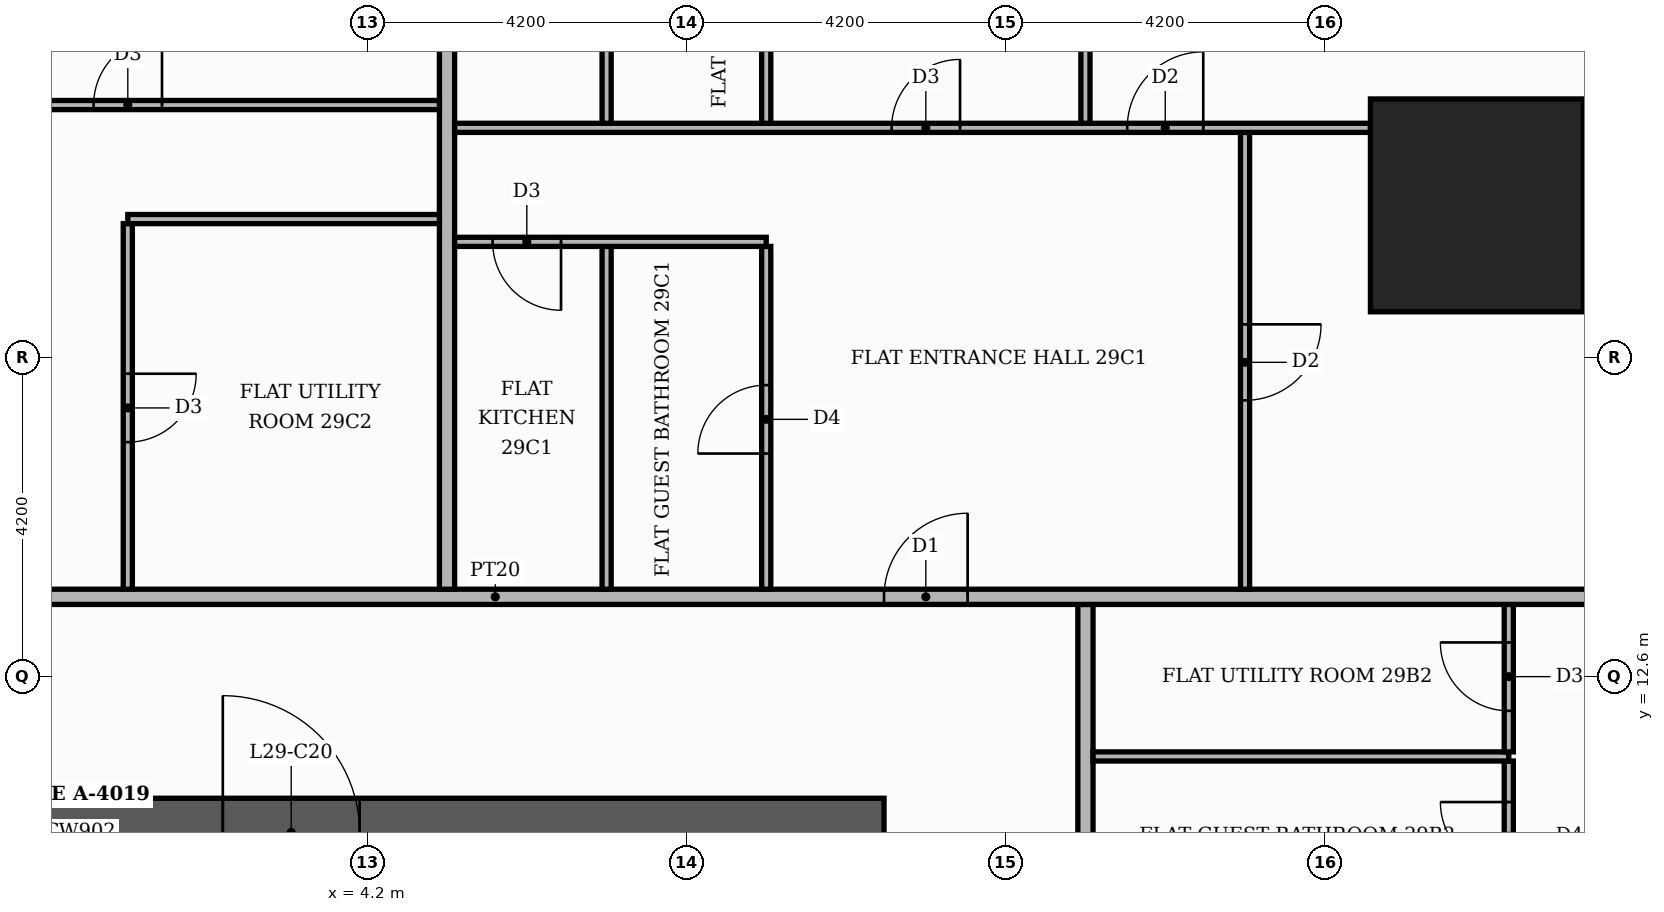
"""IFC4 building model, lengths in metres.
Left out: names, types, materials, properties, quantities, classifications, styles, units other than length and angle.
Written with IfcOpenShell. Run it as: python <this file> out.ifc"""

import sys

from ifc_helpers import new_model, si_unit, direction, frame, frame_2d, origin, origin_2d, place, context, subcontext, project, spatial, rectangle, extrude, element, fill, save


model = new_model("IFC4")
c1 = context("Model", 3, precision=1e-05, world=origin(), true_north=direction((0.0, 1.0)))
c2 = subcontext(c1, "Body", "Model", "MODEL_VIEW")
j1 = project(units=[si_unit("LENGTHUNIT", "METRE"), si_unit("PLANEANGLEUNIT", "RADIAN")], contexts=[c1])
p1 = place(None, origin())
s1 = spatial("IfcSite", under=j1, at=p1, CompositionType="ELEMENT")
p2 = place(p1, origin())
s2 = spatial("IfcBuilding", under=s1, at=p2, CompositionType="ELEMENT")
p3 = place(p2, frame((0.0, 0.0, 122.1)))
s3 = spatial("IfcBuildingStorey", under=s2, at=p3, CompositionType="ELEMENT", Elevation=122.1)
p4 = place(p3, frame((-11.0, 10.55, 0.0), z_axis=(0.0, 0.0, 1.0), x_axis=(1.0, 0.0, 0.0)))
e1 = element("IfcWall", 1, at=p4, inside=s3, PredefinedType="SHEAR", context=c2, shape_type="SweptSolid", body=[
    extrude(rectangle(XDim=22.0, YDim=0.9, at=frame_2d((11.0, 0.0))), origin(), (0.0, 0.0, 1.0), 3.4),
])
p5 = place(p4, frame((13.3, 0.0, 0.0)))
e2 = element("IfcOpeningElement", 2, at=p5, cuts=e1, PredefinedType="OPENING", context=c2, shape_type="SweptSolid", body=[
    extrude(rectangle(XDim=1.8, YDim=2.2, at=frame_2d((0.9, 1.1))), frame((0.0, 0.46, 0.0), z_axis=(0.0, -1.0, 0.0), x_axis=(1.0, 0.0, 0.0)), (0.0, 0.0, 1.0), 0.92),
])
p6 = place(p3, frame((18.8, 18.8, 0.0), z_axis=(0.0, 0.0, 1.0), x_axis=(1.0, 0.0, 0.0)))
e3 = element("IfcColumn", 3, at=p6, inside=s3, PredefinedType="COLUMN", context=c2, shape_type="SweptSolid", body=[
    extrude(rectangle(XDim=2.8, YDim=2.8, at=origin_2d()), origin(), (0.0, 0.0, 1.0), 3.9),
])
p7 = place(p3, frame((13.65, -5.15, 0.0), z_axis=(0.0, 0.0, 1.0), x_axis=(0.0, 1.0, 0.0)))
e4 = element("IfcWall", 4, at=p7, inside=s3, PredefinedType="PARTITIONING", context=c2, shape_type="SweptSolid", body=[
    extrude(rectangle(XDim=18.7, YDim=0.2, at=frame_2d((9.35, 0.0))), origin(), (0.0, 0.0, 1.0), 3.4),
])
p8 = place(p7, frame((5.65, 0.0, 0.0)))
e5 = element("IfcOpeningElement", 5, at=p8, cuts=e4, PredefinedType="OPENING", context=c2, shape_type="SweptSolid", body=[
    extrude(rectangle(XDim=1.1, YDim=2.4, at=frame_2d((0.55, 1.2))), frame((0.0, 0.11, 0.0), z_axis=(0.0, -1.0, 0.0), x_axis=(1.0, 0.0, 0.0)), (0.0, 0.0, 1.0), 0.22),
])
p9 = place(p3, frame((19.22, 9.51, 0.0), z_axis=(0.0, 0.0, 1.0), x_axis=(0.0, 1.0, 0.0)))
e6 = element("IfcWall", 6, at=p9, inside=s3, PredefinedType="PARTITIONING", context=c2, shape_type="SweptSolid", body=[
    extrude(rectangle(XDim=1.98, YDim=0.12, at=frame_2d((0.99, 0.0))), origin(), (0.0, 0.0, 1.0), 3.4),
])
p10 = place(p9, frame((0.54, 0.0, 0.0)))
e7 = element("IfcOpeningElement", 7, at=p10, cuts=e6, PredefinedType="OPENING", context=c2, shape_type="SweptSolid", body=[
    extrude(rectangle(XDim=0.9, YDim=2.1, at=frame_2d((0.45, 1.05))), frame((0.0, 0.07, 0.0), z_axis=(0.0, -1.0, 0.0), x_axis=(1.0, 0.0, 0.0)), (0.0, 0.0, 1.0), 0.14),
])
p11 = place(p3, frame((13.75, 11.55, 0.0), z_axis=(0.0, 0.0, 1.0), x_axis=(1.0, 0.0, 0.0)))
e8 = element("IfcWall", 8, at=p11, inside=s3, PredefinedType="PARTITIONING", context=c2, shape_type="SweptSolid", body=[
    extrude(rectangle(XDim=5.47, YDim=0.12, at=frame_2d((2.735, 0.0))), origin(), (0.0, 0.0, 1.0), 3.4),
])
p12 = place(p3, frame((19.22, 11.61, 0.0), z_axis=(0.0, 0.0, 1.0), x_axis=(0.0, 1.0, 0.0)))
e9 = element("IfcWall", 9, at=p12, inside=s3, PredefinedType="PARTITIONING", context=c2, shape_type="SweptSolid", body=[
    extrude(rectangle(XDim=1.94, YDim=0.12, at=frame_2d((0.97, 0.0))), origin(), (0.0, 0.0, 1.0), 3.4),
])
p13 = place(p12, frame((0.54, 0.0, 0.0)))
e10 = element("IfcOpeningElement", 10, at=p13, cuts=e9, PredefinedType="OPENING", context=c2, shape_type="SweptSolid", body=[
    extrude(rectangle(XDim=0.9, YDim=2.1, at=frame_2d((0.45, 1.05))), frame((0.0, 0.07, 0.0), z_axis=(0.0, -1.0, 0.0), x_axis=(1.0, 0.0, 0.0)), (0.0, 0.0, 1.0), 0.14),
])
p14 = place(p3, frame((-13.65, 13.65, 0.0), z_axis=(0.0, 0.0, 1.0), x_axis=(1.0, 0.0, 0.0)))
e11 = element("IfcWall", 11, at=p14, inside=s3, PredefinedType="PARTITIONING", context=c2, shape_type="SweptSolid", body=[
    extrude(rectangle(XDim=39.07, YDim=0.2, at=frame_2d((19.535, 0.0))), origin(), (0.0, 0.0, 1.0), 3.4),
])
p15 = place(p14, frame((24.65, 0.0, 0.0)))
e12 = element("IfcOpeningElement", 12, at=p15, cuts=e11, PredefinedType="OPENING", context=c2, shape_type="SweptSolid", body=[
    extrude(rectangle(XDim=1.1, YDim=2.4, at=frame_2d((0.55, 1.2))), frame((0.0, 0.11, 0.0), z_axis=(0.0, -1.0, 0.0), x_axis=(1.0, 0.0, 0.0)), (0.0, 0.0, 1.0), 0.22),
])
p16 = place(p14, frame((12.05, 0.0, 0.0)))
e13 = element("IfcOpeningElement", 13, at=p16, cuts=e11, PredefinedType="OPENING", context=c2, shape_type="SweptSolid", body=[
    extrude(rectangle(XDim=1.1, YDim=2.4, at=frame_2d((0.55, 1.2))), frame((0.0, 0.11, 0.0), z_axis=(0.0, -1.0, 0.0), x_axis=(1.0, 0.0, 0.0)), (0.0, 0.0, 1.0), 0.22),
])
p17 = place(p3, frame((1.05, 13.75, 0.0), z_axis=(0.0, 0.0, 1.0), x_axis=(0.0, 1.0, 0.0)))
e14 = element("IfcWall", 14, at=p17, inside=s3, PredefinedType="PARTITIONING", context=c2, shape_type="SweptSolid", body=[
    extrude(rectangle(XDim=4.81, YDim=0.12, at=frame_2d((2.405, 0.0))), origin(), (0.0, 0.0, 1.0), 3.4),
])
p18 = place(p17, frame((1.935, 0.0, 0.0)))
e15 = element("IfcOpeningElement", 15, at=p18, cuts=e14, PredefinedType="OPENING", context=c2, shape_type="SweptSolid", body=[
    extrude(rectangle(XDim=0.9, YDim=2.1, at=frame_2d((0.45, 1.05))), frame((0.0, 0.07, 0.0), z_axis=(0.0, -1.0, 0.0), x_axis=(1.0, 0.0, 0.0)), (0.0, 0.0, 1.0), 0.14),
])
p19 = place(p3, frame((5.25, 13.75, 0.0), z_axis=(0.0, 0.0, 1.0), x_axis=(0.0, 1.0, 0.0)))
e16 = element("IfcWall", 16, at=p19, inside=s3, PredefinedType="PARTITIONING", context=c2, shape_type="SweptSolid", body=[
    extrude(rectangle(XDim=11.67, YDim=0.2, at=frame_2d((5.835, 0.0))), origin(), (0.0, 0.0, 1.0), 3.4),
])
p20 = place(p3, frame((7.35, 13.75, 0.0), z_axis=(0.0, 0.0, 1.0), x_axis=(0.0, 1.0, 0.0)))
e17 = element("IfcWall", 17, at=p20, inside=s3, PredefinedType="PARTITIONING", context=c2, shape_type="SweptSolid", body=[
    extrude(rectangle(XDim=4.51, YDim=0.12, at=frame_2d((2.255, 0.0))), origin(), (0.0, 0.0, 1.0), 3.4),
])
p21 = place(p3, frame((9.45, 13.75, 0.0), z_axis=(0.0, 0.0, 1.0), x_axis=(0.0, 1.0, 0.0)))
e18 = element("IfcWall", 18, at=p21, inside=s3, PredefinedType="PARTITIONING", context=c2, shape_type="SweptSolid", body=[
    extrude(rectangle(XDim=4.51, YDim=0.12, at=frame_2d((2.255, 0.0))), origin(), (0.0, 0.0, 1.0), 3.4),
])
p22 = place(p21, frame((1.785, 0.0, 0.0)))
e19 = element("IfcOpeningElement", 19, at=p22, cuts=e18, PredefinedType="OPENING", context=c2, shape_type="SweptSolid", body=[
    extrude(rectangle(XDim=0.9, YDim=2.1, at=frame_2d((0.45, 1.05))), frame((0.0, 0.07, 0.0), z_axis=(0.0, -1.0, 0.0), x_axis=(1.0, 0.0, 0.0)), (0.0, 0.0, 1.0), 0.14),
])
p23 = place(p3, frame((15.75, 13.75, 0.0), z_axis=(0.0, 0.0, 1.0), x_axis=(0.0, 1.0, 0.0)))
e20 = element("IfcWall", 20, at=p23, inside=s3, PredefinedType="PARTITIONING", context=c2, shape_type="SweptSolid", body=[
    extrude(rectangle(XDim=6.01, YDim=0.12, at=frame_2d((3.005, 0.0))), origin(), (0.0, 0.0, 1.0), 3.4),
])
p24 = place(p23, frame((2.485, 0.0, 0.0)))
e21 = element("IfcOpeningElement", 21, at=p24, cuts=e20, PredefinedType="OPENING", context=c2, shape_type="SweptSolid", body=[
    extrude(rectangle(XDim=1.0, YDim=2.1, at=frame_2d((0.5, 1.05))), frame((0.0, 0.07, 0.0), z_axis=(0.0, -1.0, 0.0), x_axis=(1.0, 0.0, 0.0)), (0.0, 0.0, 1.0), 0.14),
])
p25 = place(p3, frame((5.35, 18.32, 0.0), z_axis=(0.0, 0.0, 1.0), x_axis=(1.0, 0.0, 0.0)))
e22 = element("IfcWall", 22, at=p25, inside=s3, PredefinedType="PARTITIONING", context=c2, shape_type="SweptSolid", body=[
    extrude(rectangle(XDim=4.1, YDim=0.12, at=frame_2d((2.05, 0.0))), origin(), (0.0, 0.0, 1.0), 3.4),
])
p26 = place(p25, frame((0.5, 0.0, 0.0)))
e23 = element("IfcOpeningElement", 23, at=p26, cuts=e22, PredefinedType="OPENING", context=c2, shape_type="SweptSolid", body=[
    extrude(rectangle(XDim=0.9, YDim=2.1, at=frame_2d((0.45, 1.05))), frame((0.0, 0.07, 0.0), z_axis=(0.0, -1.0, 0.0), x_axis=(1.0, 0.0, 0.0)), (0.0, 0.0, 1.0), 0.14),
])
p27 = place(p3, frame((1.05, 18.62, 0.0), z_axis=(0.0, 0.0, 1.0), x_axis=(1.0, 0.0, 0.0)))
e24 = element("IfcWall", 24, at=p27, inside=s3, PredefinedType="PARTITIONING", context=c2, shape_type="SweptSolid", body=[
    extrude(rectangle(XDim=4.1, YDim=0.12, at=frame_2d((2.05, 0.0))), origin(), (0.0, 0.0, 1.0), 3.4),
])
p28 = place(p3, frame((5.35, 19.82, 0.0), z_axis=(0.0, 0.0, 1.0), x_axis=(1.0, 0.0, 0.0)))
e25 = element("IfcWall", 25, at=p28, inside=s3, PredefinedType="PARTITIONING", context=c2, shape_type="SweptSolid", body=[
    extrude(rectangle(XDim=12.05, YDim=0.12, at=frame_2d((6.025, 0.0))), origin(), (0.0, 0.0, 1.0), 3.4),
])
p29 = place(p28, frame((8.85, 0.0, 0.0)))
e26 = element("IfcOpeningElement", 26, at=p29, cuts=e25, PredefinedType="OPENING", context=c2, shape_type="SweptSolid", body=[
    extrude(rectangle(XDim=1.0, YDim=2.1, at=frame_2d((0.5, 1.05))), frame((0.0, 0.07, 0.0), z_axis=(0.0, -1.0, 0.0), x_axis=(1.0, 0.0, 0.0)), (0.0, 0.0, 1.0), 0.14),
])
p30 = place(p28, frame((5.75, 0.0, 0.0)))
e27 = element("IfcOpeningElement", 27, at=p30, cuts=e25, PredefinedType="OPENING", context=c2, shape_type="SweptSolid", body=[
    extrude(rectangle(XDim=0.9, YDim=2.1, at=frame_2d((0.45, 1.05))), frame((0.0, 0.07, 0.0), z_axis=(0.0, -1.0, 0.0), x_axis=(1.0, 0.0, 0.0)), (0.0, 0.0, 1.0), 0.14),
])
p31 = place(p3, frame((20.2, 19.82, 0.0), z_axis=(0.0, 0.0, 1.0), x_axis=(1.0, 0.0, 0.0)))
e28 = element("IfcWall", 28, at=p31, inside=s3, PredefinedType="PARTITIONING", context=c2, shape_type="SweptSolid", body=[
    extrude(rectangle(XDim=5.22, YDim=0.12, at=frame_2d((2.61, 0.0))), origin(), (0.0, 0.0, 1.0), 3.4),
])
p32 = place(p3, frame((7.35, 19.88, 0.0), z_axis=(0.0, 0.0, 1.0), x_axis=(0.0, 1.0, 0.0)))
e29 = element("IfcWall", 29, at=p32, inside=s3, PredefinedType="PARTITIONING", context=c2, shape_type="SweptSolid", body=[
    extrude(rectangle(XDim=5.54, YDim=0.12, at=frame_2d((2.77, 0.0))), origin(), (0.0, 0.0, 1.0), 3.4),
])
p33 = place(p32, frame((2.44, 0.0, 0.0)))
e30 = element("IfcOpeningElement", 30, at=p33, cuts=e29, PredefinedType="OPENING", context=c2, shape_type="SweptSolid", body=[
    extrude(rectangle(XDim=0.9, YDim=2.1, at=frame_2d((0.45, 1.05))), frame((0.0, 0.07, 0.0), z_axis=(0.0, -1.0, 0.0), x_axis=(1.0, 0.0, 0.0)), (0.0, 0.0, 1.0), 0.14),
])
p34 = place(p3, frame((9.45, 19.88, 0.0), z_axis=(0.0, 0.0, 1.0), x_axis=(0.0, 1.0, 0.0)))
e31 = element("IfcWall", 31, at=p34, inside=s3, PredefinedType="PARTITIONING", context=c2, shape_type="SweptSolid", body=[
    extrude(rectangle(XDim=5.54, YDim=0.12, at=frame_2d((2.77, 0.0))), origin(), (0.0, 0.0, 1.0), 3.4),
])
p35 = place(p34, frame((2.44, 0.0, 0.0)))
e32 = element("IfcOpeningElement", 32, at=p35, cuts=e31, PredefinedType="OPENING", context=c2, shape_type="SweptSolid", body=[
    extrude(rectangle(XDim=0.9, YDim=2.1, at=frame_2d((0.45, 1.05))), frame((0.0, 0.07, 0.0), z_axis=(0.0, -1.0, 0.0), x_axis=(1.0, 0.0, 0.0)), (0.0, 0.0, 1.0), 0.14),
])
p36 = place(p3, frame((13.65, 19.88, 0.0), z_axis=(0.0, 0.0, 1.0), x_axis=(0.0, 1.0, 0.0)))
e33 = element("IfcWall", 33, at=p36, inside=s3, PredefinedType="PARTITIONING", context=c2, shape_type="SweptSolid", body=[
    extrude(rectangle(XDim=5.54, YDim=0.12, at=frame_2d((2.77, 0.0))), origin(), (0.0, 0.0, 1.0), 3.4),
])
p37 = place(p3, frame((-13.55, 20.12, 0.0), z_axis=(0.0, 0.0, 1.0), x_axis=(1.0, 0.0, 0.0)))
e34 = element("IfcWall", 34, at=p37, inside=s3, PredefinedType="PARTITIONING", context=c2, shape_type="SweptSolid", body=[
    extrude(rectangle(XDim=18.7, YDim=0.12, at=frame_2d((9.35, 0.0))), origin(), (0.0, 0.0, 1.0), 3.4),
])
p38 = place(p37, frame((14.15, 0.0, 0.0)))
e35 = element("IfcOpeningElement", 35, at=p38, cuts=e34, PredefinedType="OPENING", context=c2, shape_type="SweptSolid", body=[
    extrude(rectangle(XDim=0.9, YDim=2.1, at=frame_2d((0.45, 1.05))), frame((0.0, 0.07, 0.0), z_axis=(0.0, -1.0, 0.0), x_axis=(1.0, 0.0, 0.0)), (0.0, 0.0, 1.0), 0.14),
])
p39 = place(p37, frame((2.55, 0.0, 0.0)))
e36 = element("IfcOpeningElement", 36, at=p39, cuts=e34, PredefinedType="OPENING", context=c2, shape_type="SweptSolid", body=[
    extrude(rectangle(XDim=1.0, YDim=2.1, at=frame_2d((0.5, 1.05))), frame((0.0, 0.07, 0.0), z_axis=(0.0, -1.0, 0.0), x_axis=(1.0, 0.0, 0.0)), (0.0, 0.0, 1.0), 0.14),
])
p40 = place(p5, origin())
e37 = element("IfcDoor", 37, at=p40, inside=s3, OperationType="DOUBLE_DOOR_SINGLE_SWING", PredefinedType="DOOR", context=c2, shape_type="SweptSolid", body=[
    extrude(rectangle(XDim=1.8, YDim=2.2, at=frame_2d((0.9, 1.1))), frame((0.0, 0.025, 0.0), z_axis=(0.0, -1.0, 0.0), x_axis=(1.0, 0.0, 0.0)), (0.0, 0.0, 1.0), 0.05),
])
fill(e2, e37)
p41 = place(p10, origin())
e38 = element("IfcDoor", 38, at=p41, inside=s3, OperationType="SINGLE_SWING_RIGHT", PredefinedType="DOOR", context=c2, shape_type="SweptSolid", body=[
    extrude(rectangle(XDim=0.9, YDim=2.1, at=frame_2d((0.45, 1.05))), frame((0.0, 0.025, 0.0), z_axis=(0.0, -1.0, 0.0), x_axis=(1.0, 0.0, 0.0)), (0.0, 0.0, 1.0), 0.05),
])
fill(e7, e38)
p42 = place(p13, origin())
e39 = element("IfcDoor", 39, at=p42, inside=s3, OperationType="SINGLE_SWING_RIGHT", PredefinedType="DOOR", context=c2, shape_type="SweptSolid", body=[
    extrude(rectangle(XDim=0.9, YDim=2.1, at=frame_2d((0.45, 1.05))), frame((0.0, 0.025, 0.0), z_axis=(0.0, -1.0, 0.0), x_axis=(1.0, 0.0, 0.0)), (0.0, 0.0, 1.0), 0.05),
])
fill(e10, e39)
p43 = place(p15, origin())
e40 = element("IfcDoor", 40, at=p43, inside=s3, OperationType="SINGLE_SWING_RIGHT", PredefinedType="DOOR", context=c2, shape_type="SweptSolid", body=[
    extrude(rectangle(XDim=1.1, YDim=2.4, at=frame_2d((0.55, 1.2))), frame((0.0, 0.025, 0.0), z_axis=(0.0, -1.0, 0.0), x_axis=(1.0, 0.0, 0.0)), (0.0, 0.0, 1.0), 0.05),
])
fill(e12, e40)
p44 = place(p24, frame((1.0, 0.0, 0.0), z_axis=(0.0, 0.0, 1.0), x_axis=(-1.0, 0.0, 0.0)))
e41 = element("IfcDoor", 41, at=p44, inside=s3, OperationType="SINGLE_SWING_RIGHT", PredefinedType="DOOR", context=c2, shape_type="SweptSolid", body=[
    extrude(rectangle(XDim=1.0, YDim=2.1, at=frame_2d((0.5, 1.05))), frame((0.0, 0.025, 0.0), z_axis=(0.0, -1.0, 0.0), x_axis=(1.0, 0.0, 0.0)), (0.0, 0.0, 1.0), 0.05),
])
fill(e21, e41)
p45 = place(p22, origin())
e42 = element("IfcDoor", 42, at=p45, inside=s3, OperationType="SINGLE_SWING_LEFT", PredefinedType="DOOR", context=c2, shape_type="SweptSolid", body=[
    extrude(rectangle(XDim=0.9, YDim=2.1, at=frame_2d((0.45, 1.05))), frame((0.0, 0.025, 0.0), z_axis=(0.0, -1.0, 0.0), x_axis=(1.0, 0.0, 0.0)), (0.0, 0.0, 1.0), 0.05),
])
fill(e19, e42)
p46 = place(p26, frame((0.9, 0.0, 0.0), z_axis=(0.0, 0.0, 1.0), x_axis=(-1.0, 0.0, 0.0)))
e43 = element("IfcDoor", 43, at=p46, inside=s3, OperationType="SINGLE_SWING_RIGHT", PredefinedType="DOOR", context=c2, shape_type="SweptSolid", body=[
    extrude(rectangle(XDim=0.9, YDim=2.1, at=frame_2d((0.45, 1.05))), frame((0.0, 0.025, 0.0), z_axis=(0.0, -1.0, 0.0), x_axis=(1.0, 0.0, 0.0)), (0.0, 0.0, 1.0), 0.05),
])
fill(e23, e43)
p47 = place(p29, origin())
e44 = element("IfcDoor", 44, at=p47, inside=s3, OperationType="SINGLE_SWING_RIGHT", PredefinedType="DOOR", context=c2, shape_type="SweptSolid", body=[
    extrude(rectangle(XDim=1.0, YDim=2.1, at=frame_2d((0.5, 1.05))), frame((0.0, 0.025, 0.0), z_axis=(0.0, -1.0, 0.0), x_axis=(1.0, 0.0, 0.0)), (0.0, 0.0, 1.0), 0.05),
])
fill(e26, e44)
p48 = place(p30, origin())
e45 = element("IfcDoor", 45, at=p48, inside=s3, OperationType="SINGLE_SWING_RIGHT", PredefinedType="DOOR", context=c2, shape_type="SweptSolid", body=[
    extrude(rectangle(XDim=0.9, YDim=2.1, at=frame_2d((0.45, 1.05))), frame((0.0, 0.025, 0.0), z_axis=(0.0, -1.0, 0.0), x_axis=(1.0, 0.0, 0.0)), (0.0, 0.0, 1.0), 0.05),
])
fill(e27, e45)
p49 = place(p18, frame((0.9, 0.0, 0.0), z_axis=(0.0, 0.0, 1.0), x_axis=(-1.0, 0.0, 0.0)))
e46 = element("IfcDoor", 46, at=p49, inside=s3, OperationType="SINGLE_SWING_RIGHT", PredefinedType="DOOR", context=c2, shape_type="SweptSolid", body=[
    extrude(rectangle(XDim=0.9, YDim=2.1, at=frame_2d((0.45, 1.05))), frame((0.0, 0.025, 0.0), z_axis=(0.0, -1.0, 0.0), x_axis=(1.0, 0.0, 0.0)), (0.0, 0.0, 1.0), 0.05),
])
fill(e15, e46)
p50 = place(p38, origin())
e47 = element("IfcDoor", 47, at=p50, inside=s3, OperationType="SINGLE_SWING_RIGHT", PredefinedType="DOOR", context=c2, shape_type="SweptSolid", body=[
    extrude(rectangle(XDim=0.9, YDim=2.1, at=frame_2d((0.45, 1.05))), frame((0.0, 0.025, 0.0), z_axis=(0.0, -1.0, 0.0), x_axis=(1.0, 0.0, 0.0)), (0.0, 0.0, 1.0), 0.05),
])
fill(e35, e47)
save(model, sys.argv[1])
